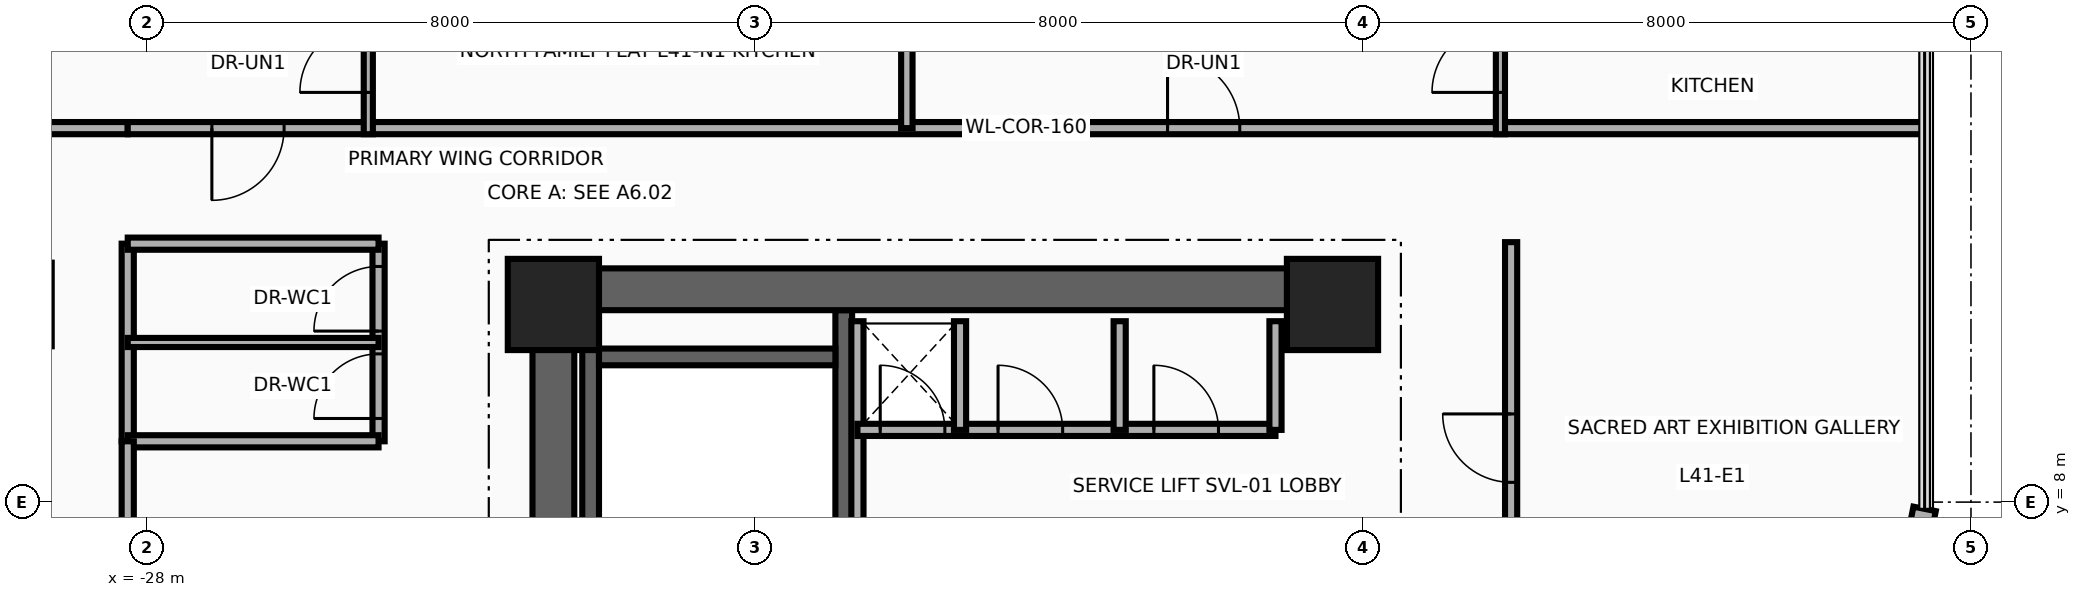
"""IFC4 building model, lengths in metres.
Left out: names, types, materials, properties, quantities, classifications, styles, units other than length and angle.
Written with IfcOpenShell. Run it as: python <this file> out.ifc"""

import sys

from ifc_helpers import new_model, si_unit, direction, frame, frame_2d, origin, origin_2d, place, context, subcontext, project, spatial, rectangle, extrude, source, transform, mapped, element, fill, save


model = new_model("IFC4")
c1 = context("Model", 3, precision=1e-05, world=origin(), true_north=direction((0.0, 1.0)))
c2 = subcontext(c1, "Body", "Model", "MODEL_VIEW")
j1 = project(units=[si_unit("LENGTHUNIT", "METRE"), si_unit("PLANEANGLEUNIT", "RADIAN")], contexts=[c1])
p1 = place(None, origin())
s1 = spatial("IfcSite", under=j1, at=p1, CompositionType="ELEMENT")
p2 = place(p1, origin())
s2 = spatial("IfcBuilding", under=s1, at=p2, CompositionType="ELEMENT")
p3 = place(p2, frame((0.0, 0.0, 161.2)))
s3 = spatial("IfcBuildingStorey", under=s2, at=p3, CompositionType="ELEMENT", Elevation=161.2)
for number, where, z_axis, x_axis in (
    (1, (-22.16, 1.78, 0.0), (0.0, 0.0, 1.0), (0.0, 1.0, 0.0)),
    (2, (-18.83, 1.78, 0.0), (0.0, 0.0, 1.0), (0.0, 1.0, 0.0)),
):
    element("IfcWall", number, at=place(p3, frame(where, z_axis=z_axis, x_axis=x_axis)), inside=s3, PredefinedType="SHEAR", context=c2, shape_type="SweptSolid", body=[
        extrude(rectangle(XDim=8.745, YDim=0.22, at=frame_2d((4.373, 0.0))), origin(), (0.0, 0.0, 1.0), 3.46),
    ])
p4 = place(p3, frame((-22.05, 9.91, 0.0), z_axis=(0.0, 0.0, 1.0), x_axis=(1.0, 0.0, 0.0)))
e3 = element("IfcWall", 3, at=p4, inside=s3, PredefinedType="SHEAR", context=c2, shape_type="SweptSolid", body=[
    extrude(rectangle(XDim=3.11, YDim=0.22, at=frame_2d((1.555, 0.0))), origin(), (0.0, 0.0, 1.0), 3.46),
])
p5 = place(p3, frame((-22.65, -11.075, 0.0), z_axis=(0.0, 0.0, 1.0), x_axis=(0.0, 1.0, 0.0)))
e4 = element("IfcWall", 4, at=p5, inside=s3, PredefinedType="SHEAR", context=c2, shape_type="SweptSolid", body=[
    extrude(rectangle(XDim=22.15, YDim=0.55, at=frame_2d((11.075, 0.0))), origin(), (0.0, 0.0, 1.0), 3.46),
])
p6 = place(p3, frame((-22.65, 10.8, 0.0), z_axis=(0.0, 0.0, 1.0), x_axis=(1.0, 0.0, 0.0)))
e5 = element("IfcWall", 5, at=p6, inside=s3, PredefinedType="SHEAR", context=c2, shape_type="SweptSolid", body=[
    extrude(rectangle(XDim=10.25, YDim=0.55, at=frame_2d((5.125, 0.0))), origin(), (0.0, 0.0, 1.0), 3.46),
])
m1 = source(origin(), c2, "Body", "SweptSolid", [
    extrude(rectangle(XDim=1.2, YDim=1.2, at=origin_2d()), origin(), (0.0, 0.0, 1.0), 3.7),
])
for number, where, z_axis, x_axis in (
    (6, (-22.65, 10.6, 0.0), (0.0, 0.0, 1.0), (1.0, 0.0, 0.0)),
    (7, (-12.4, 10.6, 0.0), (0.0, 0.0, 1.0), (1.0, 0.0, 0.0)),
):
    element("IfcColumn", number, at=place(p3, frame(where, z_axis=z_axis, x_axis=x_axis)), inside=s3, PredefinedType="COLUMN", context=c2, shape_type="MappedRepresentation", body=[
        mapped(m1, transform((0.0, 0.0, 0.0), x_axis=(1.0, 0.0, 0.0), y_axis=(0.0, 1.0, 0.0), z_axis=(0.0, 0.0, 1.0), scale=1.0)),
    ])
p7 = place(p3, frame((-4.61, 7.911, 0.0), z_axis=(0.0, 0.0, 1.0), x_axis=(-0.194989739953, -0.980805282058, 0.0)))
e8 = element("IfcWall", 8, at=p7, inside=s3, PredefinedType="SOLIDWALL", context=c2, shape_type="SweptSolid", body=[
    extrude(rectangle(XDim=0.709, YDim=0.3, at=frame_2d((0.354, 0.0))), origin(), (0.0, 0.0, 1.0), 3.46),
])
p8 = place(p3, frame((-18.65, 7.45, 0.0), z_axis=(0.0, 0.0, 1.0), x_axis=(0.0, 1.0, 0.0)))
e9 = element("IfcWall", 9, at=p8, inside=s3, PredefinedType="PARTITIONING", context=c2, shape_type="SweptSolid", body=[
    extrude(rectangle(XDim=2.93, YDim=0.16, at=frame_2d((1.465, 0.0))), origin(), (0.0, 0.0, 1.0), 3.46),
])
p9 = place(p3, frame((-18.65, 8.95, 0.0), z_axis=(0.0, 0.0, 1.0), x_axis=(1.0, 0.0, 0.0)))
e10 = element("IfcWall", 10, at=p9, inside=s3, PredefinedType="PARTITIONING", context=c2, shape_type="SweptSolid", body=[
    extrude(rectangle(XDim=5.5, YDim=0.16, at=frame_2d((2.75, 0.0))), origin(), (0.0, 0.0, 1.0), 3.46),
])
p10 = place(p9, frame((0.3, 0.0, 0.0)))
e11 = element("IfcOpeningElement", 11, at=p10, cuts=e10, PredefinedType="OPENING", context=c2, shape_type="SweptSolid", body=[
    extrude(rectangle(XDim=0.85, YDim=2.05, at=frame_2d((0.425, 1.025))), frame((0.0, 0.095, 0.0), z_axis=(0.0, -1.0, 0.0), x_axis=(1.0, 0.0, 0.0)), (0.0, 0.0, 1.0), 0.19),
])
p11 = place(p9, frame((1.85, 0.0, 0.0)))
e12 = element("IfcOpeningElement", 12, at=p11, cuts=e10, PredefinedType="OPENING", context=c2, shape_type="SweptSolid", body=[
    extrude(rectangle(XDim=0.85, YDim=2.05, at=frame_2d((0.425, 1.025))), frame((0.0, 0.095, 0.0), z_axis=(0.0, -1.0, 0.0), x_axis=(1.0, 0.0, 0.0)), (0.0, 0.0, 1.0), 0.19),
])
p12 = place(p9, frame((3.9, 0.0, 0.0)))
e13 = element("IfcOpeningElement", 13, at=p12, cuts=e10, PredefinedType="OPENING", context=c2, shape_type="SweptSolid", body=[
    extrude(rectangle(XDim=0.85, YDim=2.05, at=frame_2d((0.425, 1.025))), frame((0.0, 0.095, 0.0), z_axis=(0.0, -1.0, 0.0), x_axis=(1.0, 0.0, 0.0)), (0.0, 0.0, 1.0), 0.19),
])
for number, where, z_axis, x_axis in (
    (14, (-13.15, 8.95, 0.0), (0.0, 0.0, 1.0), (0.0, 1.0, 0.0)),
    (15, (-17.3, 8.95, 0.0), (0.0, 0.0, 1.0), (0.0, 1.0, 0.0)),
    (16, (-15.2, 8.95, 0.0), (0.0, 0.0, 1.0), (0.0, 1.0, 0.0)),
):
    element("IfcWall", number, at=place(p3, frame(where, z_axis=z_axis, x_axis=x_axis)), inside=s3, PredefinedType="PARTITIONING", context=c2, shape_type="SweptSolid", body=[
        extrude(rectangle(XDim=1.43, YDim=0.16, at=frame_2d((0.715, 0.0))), origin(), (0.0, 0.0, 1.0), 3.46),
    ])
p13 = place(p3, frame((-28.25, 8.8, 0.0), z_axis=(0.0, 0.0, 1.0), x_axis=(0.0, 1.0, 0.0)))
e17 = element("IfcWall", 17, at=p13, inside=s3, PredefinedType="PARTITIONING", context=c2, shape_type="SweptSolid", body=[
    extrude(rectangle(XDim=2.6, YDim=0.16, at=frame_2d((1.3, 0.0))), origin(), (0.0, 0.0, 1.0), 2.666),
])
p14 = place(p3, frame((-24.95, 8.8, 0.0), z_axis=(0.0, 0.0, 1.0), x_axis=(0.0, 1.0, 0.0)))
e18 = element("IfcWall", 18, at=p14, inside=s3, PredefinedType="PARTITIONING", context=c2, shape_type="SweptSolid", body=[
    extrude(rectangle(XDim=2.6, YDim=0.16, at=frame_2d((1.3, 0.0))), origin(), (0.0, 0.0, 1.0), 2.666),
])
p15 = place(p14, frame((0.3, 0.0, 0.0)))
e19 = element("IfcOpeningElement", 19, at=p15, cuts=e18, PredefinedType="OPENING", context=c2, shape_type="SweptSolid", body=[
    extrude(rectangle(XDim=0.85, YDim=2.1, at=frame_2d((0.425, 1.05))), frame((0.0, 0.095, 0.0), z_axis=(0.0, -1.0, 0.0), x_axis=(1.0, 0.0, 0.0)), (0.0, 0.0, 1.0), 0.19),
])
p16 = place(p14, frame((1.45, 0.0, 0.0)))
e20 = element("IfcOpeningElement", 20, at=p16, cuts=e18, PredefinedType="OPENING", context=c2, shape_type="SweptSolid", body=[
    extrude(rectangle(XDim=0.85, YDim=2.1, at=frame_2d((0.425, 1.05))), frame((0.0, 0.095, 0.0), z_axis=(0.0, -1.0, 0.0), x_axis=(1.0, 0.0, 0.0)), (0.0, 0.0, 1.0), 0.19),
])
for number, where, z_axis, x_axis in (
    (21, (-28.25, 8.8, 0.0), (0.0, 0.0, 1.0), (1.0, 0.0, 0.0)),
    (22, (-28.25, 11.4, 0.0), (0.0, 0.0, 1.0), (1.0, 0.0, 0.0)),
):
    element("IfcWall", number, at=place(p3, frame(where, z_axis=z_axis, x_axis=x_axis)), inside=s3, PredefinedType="PARTITIONING", context=c2, shape_type="SweptSolid", body=[
        extrude(rectangle(XDim=3.3, YDim=0.16, at=frame_2d((1.65, 0.0))), origin(), (0.0, 0.0, 1.0), 3.46),
    ])
p17 = place(p3, frame((-28.25, 10.1, 0.0), z_axis=(0.0, 0.0, 1.0), x_axis=(1.0, 0.0, 0.0)))
e23 = element("IfcWall", 23, at=p17, inside=s3, PredefinedType="PARTITIONING", context=c2, shape_type="SweptSolid", body=[
    extrude(rectangle(XDim=3.3, YDim=0.12, at=frame_2d((1.65, 0.0))), origin(), (0.0, 0.0, 1.0), 3.46),
])
p18 = place(p3, frame((-28.25, 5.8, 0.0), z_axis=(0.0, 0.0, 1.0), x_axis=(0.0, 1.0, 0.0)))
e24 = element("IfcWall", 24, at=p18, inside=s3, PredefinedType="PARTITIONING", context=c2, shape_type="SweptSolid", body=[
    extrude(rectangle(XDim=3.0, YDim=0.16, at=frame_2d((1.5, 0.0))), origin(), (0.0, 0.0, 1.0), 2.988),
])
p19 = place(p3, frame((-30.89, 12.92, 0.0), z_axis=(0.0, 0.0, 1.0), x_axis=(1.0, 0.0, 0.0)))
e25 = element("IfcWall", 25, at=p19, inside=s3, PredefinedType="PARTITIONING", context=c2, shape_type="SweptSolid", body=[
    extrude(rectangle(XDim=2.64, YDim=0.16, at=frame_2d((1.32, 0.0))), origin(), (0.0, 0.0, 1.0), 2.896),
])
p20 = place(p3, frame((-28.25, 12.92, 0.0), z_axis=(0.0, 0.0, 1.0), x_axis=(1.0, 0.0, 0.0)))
e26 = element("IfcWall", 26, at=p20, inside=s3, PredefinedType="PARTITIONING", context=c2, shape_type="SweptSolid", body=[
    extrude(rectangle(XDim=23.64, YDim=0.16, at=frame_2d((11.82, 0.0))), origin(), (0.0, 0.0, 1.0), 2.834),
])
p21 = place(p20, frame((1.107, 0.0, 0.0)))
e27 = element("IfcOpeningElement", 27, at=p21, cuts=e26, PredefinedType="OPENING", context=c2, shape_type="SweptSolid", body=[
    extrude(rectangle(XDim=0.95, YDim=2.15, at=frame_2d((0.475, 1.075))), frame((0.0, 0.095, 0.0), z_axis=(0.0, -1.0, 0.0), x_axis=(1.0, 0.0, 0.0)), (0.0, 0.0, 1.0), 0.19),
])
p22 = place(p20, frame((13.68, 0.0, 0.0)))
e28 = element("IfcOpeningElement", 28, at=p22, cuts=e26, PredefinedType="OPENING", context=c2, shape_type="SweptSolid", body=[
    extrude(rectangle(XDim=0.95, YDim=2.15, at=frame_2d((0.475, 1.075))), frame((0.0, 0.095, 0.0), z_axis=(0.0, -1.0, 0.0), x_axis=(1.0, 0.0, 0.0)), (0.0, 0.0, 1.0), 0.19),
])
p23 = place(p3, frame((-18.0, 12.92, 0.0), z_axis=(0.0, 0.0, 1.0), x_axis=(0.0, 1.0, 0.0)))
e29 = element("IfcWall", 29, at=p23, inside=s3, PredefinedType="PARTITIONING", context=c2, shape_type="SweptSolid", body=[
    extrude(rectangle(XDim=6.457, YDim=0.15, at=frame_2d((3.229, 0.0))), origin(), (0.0, 0.0, 1.0), 2.666),
])
p24 = place(p3, frame((-25.085, 12.84, 0.0), z_axis=(0.0, 0.0, 1.0), x_axis=(0.0, 1.0, 0.0)))
e30 = element("IfcWall", 30, at=p24, inside=s3, PredefinedType="PARTITIONING", context=c2, shape_type="SweptSolid", body=[
    extrude(rectangle(XDim=2.08, YDim=0.12, at=frame_2d((1.04, 0.0))), origin(), (0.0, 0.0, 1.0), 2.666),
])
p25 = place(p24, frame((0.55, 0.0, 0.0)))
e31 = element("IfcOpeningElement", 31, at=p25, cuts=e30, PredefinedType="OPENING", context=c2, shape_type="SweptSolid", body=[
    extrude(rectangle(XDim=0.9, YDim=2.1, at=frame_2d((0.45, 1.05))), frame((0.0, 0.075, 0.0), z_axis=(0.0, -1.0, 0.0), x_axis=(1.0, 0.0, 0.0)), (0.0, 0.0, 1.0), 0.15),
])
p26 = place(p3, frame((-10.191, 12.84, 0.0), z_axis=(0.0, 0.0, 1.0), x_axis=(0.0, 1.0, 0.0)))
e32 = element("IfcWall", 32, at=p26, inside=s3, PredefinedType="PARTITIONING", context=c2, shape_type="SweptSolid", body=[
    extrude(rectangle(XDim=2.08, YDim=0.12, at=frame_2d((1.04, 0.0))), origin(), (0.0, 0.0, 1.0), 3.46),
])
p27 = place(p26, frame((0.55, 0.0, 0.0)))
e33 = element("IfcOpeningElement", 33, at=p27, cuts=e32, PredefinedType="OPENING", context=c2, shape_type="SweptSolid", body=[
    extrude(rectangle(XDim=0.9, YDim=2.1, at=frame_2d((0.45, 1.05))), frame((0.0, 0.075, 0.0), z_axis=(0.0, -1.0, 0.0), x_axis=(1.0, 0.0, 0.0)), (0.0, 0.0, 1.0), 0.15),
])
p28 = place(p3, frame((-10.05, 6.0, 0.0), z_axis=(0.0, 0.0, 1.0), x_axis=(0.0, 1.0, 0.0)))
e34 = element("IfcWall", 34, at=p28, inside=s3, PredefinedType="PARTITIONING", context=c2, shape_type="SweptSolid", body=[
    extrude(rectangle(XDim=5.42, YDim=0.16, at=frame_2d((2.71, 0.0))), origin(), (0.0, 0.0, 1.0), 3.46),
])
p29 = place(p28, frame((2.26, 0.0, 0.0)))
e35 = element("IfcOpeningElement", 35, at=p29, cuts=e34, PredefinedType="OPENING", context=c2, shape_type="SweptSolid", body=[
    extrude(rectangle(XDim=0.9, YDim=2.1, at=frame_2d((0.45, 1.05))), frame((0.0, 0.095, 0.0), z_axis=(0.0, -1.0, 0.0), x_axis=(1.0, 0.0, 0.0)), (0.0, 0.0, 1.0), 0.19),
])
p30 = place(p10, origin())
e36 = element("IfcDoor", 36, at=p30, inside=s3, OperationType="SINGLE_SWING_LEFT", PredefinedType="DOOR", context=c2, shape_type="SweptSolid", body=[
    extrude(rectangle(XDim=0.85, YDim=2.05, at=frame_2d((0.425, 1.025))), frame((0.0, 0.025, 0.0), z_axis=(0.0, -1.0, 0.0), x_axis=(1.0, 0.0, 0.0)), (0.0, 0.0, 1.0), 0.05),
])
fill(e11, e36)
p31 = place(p11, origin())
e37 = element("IfcDoor", 37, at=p31, inside=s3, OperationType="SINGLE_SWING_RIGHT", PredefinedType="DOOR", context=c2, shape_type="SweptSolid", body=[
    extrude(rectangle(XDim=0.85, YDim=2.05, at=frame_2d((0.425, 1.025))), frame((0.0, 0.025, 0.0), z_axis=(0.0, -1.0, 0.0), x_axis=(1.0, 0.0, 0.0)), (0.0, 0.0, 1.0), 0.05),
])
fill(e12, e37)
p32 = place(p12, origin())
e38 = element("IfcDoor", 38, at=p32, inside=s3, OperationType="SINGLE_SWING_LEFT", PredefinedType="DOOR", context=c2, shape_type="SweptSolid", body=[
    extrude(rectangle(XDim=0.85, YDim=2.05, at=frame_2d((0.425, 1.025))), frame((0.0, 0.025, 0.0), z_axis=(0.0, -1.0, 0.0), x_axis=(1.0, 0.0, 0.0)), (0.0, 0.0, 1.0), 0.05),
])
fill(e13, e38)
p33 = place(p15, origin())
e39 = element("IfcDoor", 39, at=p33, inside=s3, OperationType="SINGLE_SWING_LEFT", PredefinedType="DOOR", context=c2, shape_type="SweptSolid", body=[
    extrude(rectangle(XDim=0.85, YDim=2.1, at=frame_2d((0.425, 1.05))), frame((0.0, 0.025, 0.0), z_axis=(0.0, -1.0, 0.0), x_axis=(1.0, 0.0, 0.0)), (0.0, 0.0, 1.0), 0.05),
])
fill(e19, e39)
p34 = place(p16, origin())
e40 = element("IfcDoor", 40, at=p34, inside=s3, OperationType="SINGLE_SWING_RIGHT", PredefinedType="DOOR", context=c2, shape_type="SweptSolid", body=[
    extrude(rectangle(XDim=0.85, YDim=2.1, at=frame_2d((0.425, 1.05))), frame((0.0, 0.025, 0.0), z_axis=(0.0, -1.0, 0.0), x_axis=(1.0, 0.0, 0.0)), (0.0, 0.0, 1.0), 0.05),
])
fill(e20, e40)
p35 = place(p21, frame((0.95, 0.0, 0.0), z_axis=(0.0, 0.0, 1.0), x_axis=(-1.0, 0.0, 0.0)))
e41 = element("IfcDoor", 41, at=p35, inside=s3, OperationType="SINGLE_SWING_LEFT", PredefinedType="DOOR", context=c2, shape_type="SweptSolid", body=[
    extrude(rectangle(XDim=0.95, YDim=2.15, at=frame_2d((0.475, 1.075))), frame((0.0, 0.025, 0.0), z_axis=(0.0, -1.0, 0.0), x_axis=(1.0, 0.0, 0.0)), (0.0, 0.0, 1.0), 0.05),
])
fill(e27, e41)
p36 = place(p25, origin())
e42 = element("IfcDoor", 42, at=p36, inside=s3, OperationType="SINGLE_SWING_LEFT", PredefinedType="DOOR", context=c2, shape_type="SweptSolid", body=[
    extrude(rectangle(XDim=0.9, YDim=2.1, at=frame_2d((0.45, 1.05))), frame((0.0, 0.025, 0.0), z_axis=(0.0, -1.0, 0.0), x_axis=(1.0, 0.0, 0.0)), (0.0, 0.0, 1.0), 0.05),
])
fill(e31, e42)
p37 = place(p22, origin())
e43 = element("IfcDoor", 43, at=p37, inside=s3, OperationType="SINGLE_SWING_RIGHT", PredefinedType="DOOR", context=c2, shape_type="SweptSolid", body=[
    extrude(rectangle(XDim=0.95, YDim=2.15, at=frame_2d((0.475, 1.075))), frame((0.0, 0.025, 0.0), z_axis=(0.0, -1.0, 0.0), x_axis=(1.0, 0.0, 0.0)), (0.0, 0.0, 1.0), 0.05),
])
fill(e28, e43)
p38 = place(p27, origin())
e44 = element("IfcDoor", 44, at=p38, inside=s3, OperationType="SINGLE_SWING_RIGHT", PredefinedType="DOOR", context=c2, shape_type="SweptSolid", body=[
    extrude(rectangle(XDim=0.9, YDim=2.1, at=frame_2d((0.45, 1.05))), frame((0.0, 0.025, 0.0), z_axis=(0.0, -1.0, 0.0), x_axis=(1.0, 0.0, 0.0)), (0.0, 0.0, 1.0), 0.05),
])
fill(e33, e44)
p39 = place(p29, origin())
e45 = element("IfcDoor", 45, at=p39, inside=s3, OperationType="SINGLE_SWING_RIGHT", PredefinedType="DOOR", context=c2, shape_type="SweptSolid", body=[
    extrude(rectangle(XDim=0.9, YDim=2.1, at=frame_2d((0.45, 1.05))), frame((0.0, 0.025, 0.0), z_axis=(0.0, -1.0, 0.0), x_axis=(1.0, 0.0, 0.0)), (0.0, 0.0, 1.0), 0.05),
])
fill(e35, e45)
save(model, sys.argv[1])
